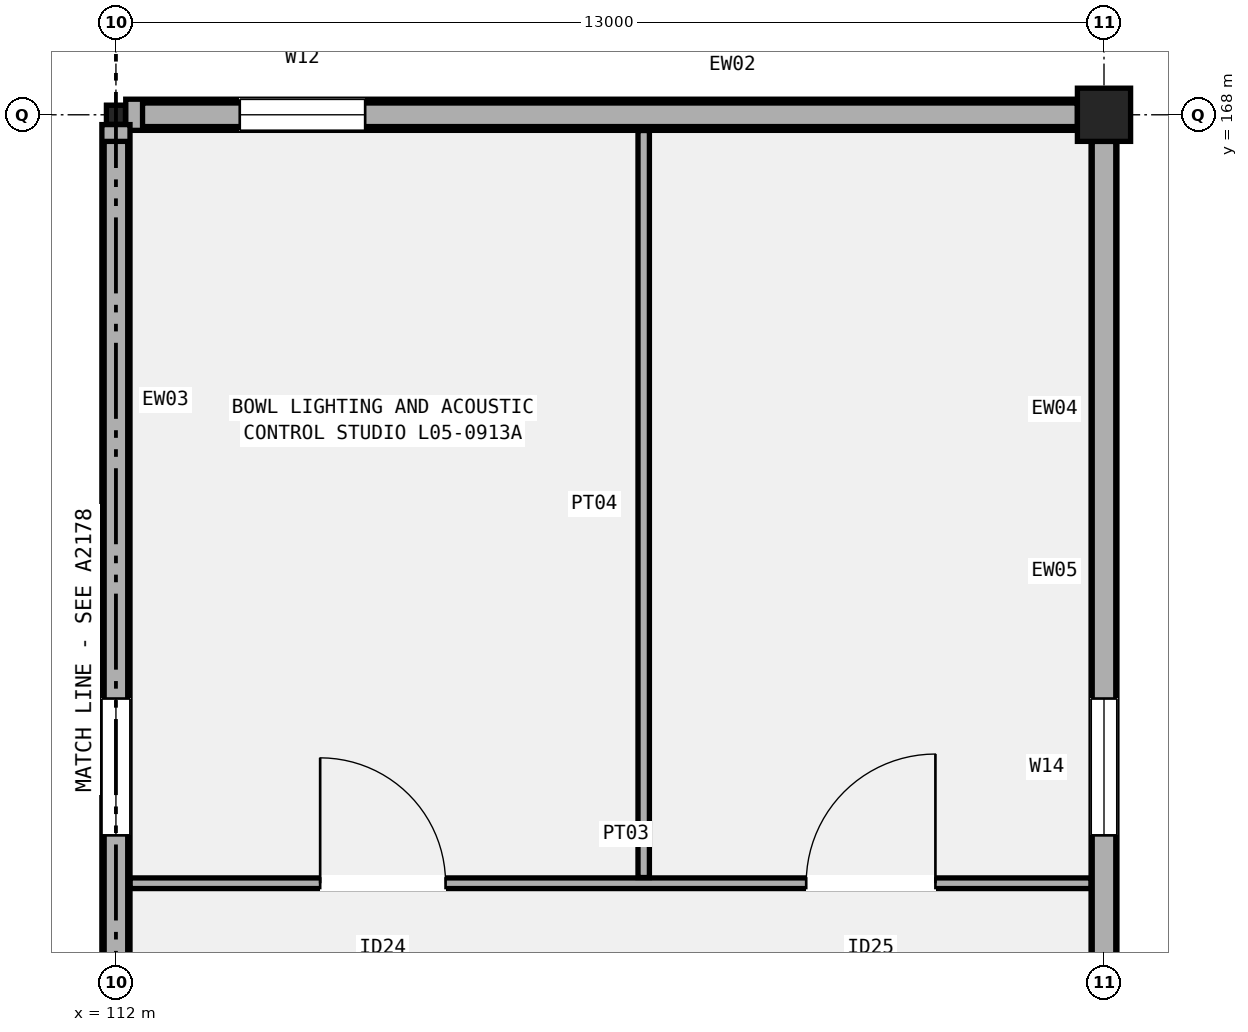
"""IFC4 building model, lengths in metres.
Left out: names, types, materials, properties, quantities, classifications, styles, units other than length and angle.
Written with IfcOpenShell. Run it as: python <this file> out.ifc"""

import sys

from ifc_helpers import new_model, si_unit, direction, frame, frame_2d, origin, origin_2d, place, context, subcontext, project, spatial, rectangle, hollow_rectangle, extrude, element, fill, save


model = new_model("IFC4")
c1 = context("Model", 3, precision=1e-05, world=origin(), true_north=direction((0.0, 1.0)))
c2 = subcontext(c1, "Body", "Model", "MODEL_VIEW")
j1 = project(units=[si_unit("LENGTHUNIT", "METRE"), si_unit("PLANEANGLEUNIT", "RADIAN")], contexts=[c1])
p1 = place(None, origin())
s1 = spatial("IfcSite", under=j1, at=p1, CompositionType="ELEMENT")
p2 = place(p1, origin())
s2 = spatial("IfcBuilding", under=s1, at=p2, CompositionType="ELEMENT")
p3 = place(p2, frame((0.0, 0.0, 25.8)))
s3 = spatial("IfcBuildingStorey", under=s2, at=p3, CompositionType="ELEMENT", Elevation=25.8)
p4 = place(p3, frame((112.0, 168.0, 0.0), z_axis=(0.0, 0.0, 1.0), x_axis=(1.0, 0.0, 0.0)))
e1 = element("IfcColumn", 1, at=p4, inside=s3, PredefinedType="COLUMN", context=c2, shape_type="SweptSolid", body=[
    extrude(hollow_rectangle(XDim=0.25, YDim=0.25, WallThickness=0.012, InnerFilletRadius=0.012, OuterFilletRadius=0.024, at=origin_2d()), origin(), (0.0, 0.0, 1.0), 5.4),
])
p5 = place(p3, frame((125.0, 168.0, 0.0), z_axis=(0.0, 0.0, 1.0), x_axis=(1.0, 0.0, 0.0)))
e2 = element("IfcColumn", 2, at=p5, inside=s3, PredefinedType="COLUMN", context=c2, shape_type="SweptSolid", body=[
    extrude(rectangle(XDim=0.7, YDim=0.7, at=origin_2d()), origin(), (0.0, 0.0, 1.0), 5.4),
])
p6 = place(p3, frame((112.129, 168.0, 0.0), z_axis=(0.0, 0.0, 1.0), x_axis=(1.0, 0.0, 0.0)))
e3 = element("IfcWall", 3, at=p6, inside=s3, PredefinedType="SOLIDWALL", context=c2, shape_type="SweptSolid", body=[
    extrude(rectangle(XDim=12.517, YDim=0.41, at=frame_2d((6.259, 0.0))), origin(), (0.0, 0.0, 1.0), 4.452),
])
p7 = place(p6, frame((1.5, 0.0, 0.95)))
e4 = element("IfcOpeningElement", 4, at=p7, cuts=e3, PredefinedType="OPENING", context=c2, shape_type="SweptSolid", body=[
    extrude(rectangle(XDim=1.65, YDim=2.45, at=frame_2d((0.825, 1.225))), frame((0.0, 0.215, 0.0), z_axis=(0.0, -1.0, 0.0), x_axis=(1.0, 0.0, 0.0)), (0.0, 0.0, 1.0), 0.43),
])
p8 = place(p3, frame((112.0, 156.154, 0.0), z_axis=(0.0, 0.0, 1.0), x_axis=(0.0, 1.0, 0.0)))
e5 = element("IfcWall", 5, at=p8, inside=s3, PredefinedType="SOLIDWALL", context=c2, shape_type="SweptSolid", body=[
    extrude(rectangle(XDim=11.717, YDim=0.37, at=frame_2d((5.858, 0.0))), origin(), (0.0, 0.0, 1.0), 4.44),
])
p9 = place(p8, frame((2.366, 0.0, 0.95)))
e6 = element("IfcOpeningElement", 6, at=p9, cuts=e5, PredefinedType="OPENING", context=c2, shape_type="SweptSolid", body=[
    extrude(rectangle(XDim=1.8, YDim=1.75, at=frame_2d((0.9, 0.875))), frame((0.0, 0.195, 0.0), z_axis=(0.0, -1.0, 0.0), x_axis=(1.0, 0.0, 0.0)), (0.0, 0.0, 1.0), 0.39),
])
p10 = place(p3, frame((125.0, 156.129, 0.0), z_axis=(0.0, 0.0, 1.0), x_axis=(0.0, 1.0, 0.0)))
e7 = element("IfcWall", 7, at=p10, inside=s3, PredefinedType="SOLIDWALL", context=c2, shape_type="SweptSolid", body=[
    extrude(rectangle(XDim=11.517, YDim=0.34, at=frame_2d((5.759, 0.0))), origin(), (0.0, 0.0, 1.0), 4.452),
])
p11 = place(p10, frame((2.391, 0.0, 0.95)))
e8 = element("IfcOpeningElement", 8, at=p11, cuts=e7, PredefinedType="OPENING", context=c2, shape_type="SweptSolid", body=[
    extrude(rectangle(XDim=1.8, YDim=2.15, at=frame_2d((0.9, 1.075))), frame((0.0, 0.18, 0.0), z_axis=(0.0, -1.0, 0.0), x_axis=(1.0, 0.0, 0.0)), (0.0, 0.0, 1.0), 0.36),
])
p12 = place(p3, frame((112.35, 168.0, 5.4), z_axis=(0.0, 0.0, 1.0), x_axis=(1.0, 0.0, 0.0)))
e9 = element("IfcWall", 9, at=p12, inside=s3, PredefinedType="SOLIDWALL", context=c2, shape_type="SweptSolid", body=[
    extrude(rectangle(XDim=12.3, YDim=0.31, at=frame_2d((6.15, 0.0))), origin(), (0.0, 0.0, 1.0), 0.88),
])
for number, where, z_axis, x_axis in (
    (10, (112.0, 156.35, 5.4), (0.0, 0.0, 1.0), (0.0, 1.0, 0.0)),
    (11, (125.0, 156.35, 5.4), (0.0, 0.0, 1.0), (0.0, 1.0, 0.0)),
):
    element("IfcWall", number, at=place(p3, frame(where, z_axis=z_axis, x_axis=x_axis)), inside=s3, PredefinedType="SOLIDWALL", context=c2, shape_type="SweptSolid", body=[
        extrude(rectangle(XDim=11.3, YDim=0.31, at=frame_2d((5.65, 0.0))), origin(), (0.0, 0.0, 1.0), 0.88),
    ])
p13 = place(p3, frame((112.187, 157.89, 0.0), z_axis=(0.0, 0.0, 1.0), x_axis=(1.0, 0.0, 0.0)))
e12 = element("IfcWall", 12, at=p13, inside=s3, PredefinedType="PARTITIONING", context=c2, shape_type="SweptSolid", body=[
    extrude(rectangle(XDim=12.641, YDim=0.14, at=frame_2d((6.32, 0.0))), origin(), (0.0, 0.0, 1.0), 4.35),
])
p14 = place(p13, frame((2.5, 0.0, 0.0)))
e13 = element("IfcOpeningElement", 13, at=p14, cuts=e12, PredefinedType="OPENING", context=c2, shape_type="SweptSolid", body=[
    extrude(rectangle(XDim=1.65, YDim=2.28, at=frame_2d((0.825, 1.14))), frame((0.0, 0.08, 0.0), z_axis=(0.0, -1.0, 0.0), x_axis=(1.0, 0.0, 0.0)), (0.0, 0.0, 1.0), 0.16),
])
p15 = place(p13, frame((8.895, 0.0, 0.0)))
e14 = element("IfcOpeningElement", 14, at=p15, cuts=e12, PredefinedType="OPENING", context=c2, shape_type="SweptSolid", body=[
    extrude(rectangle(XDim=1.7, YDim=2.32, at=frame_2d((0.85, 1.16))), frame((0.0, 0.08, 0.0), z_axis=(0.0, -1.0, 0.0), x_axis=(1.0, 0.0, 0.0)), (0.0, 0.0, 1.0), 0.16),
])
p16 = place(p3, frame((118.944, 157.965, 0.0), z_axis=(0.0, 0.0, 1.0), x_axis=(0.0, 1.0, 0.0)))
e15 = element("IfcWall", 15, at=p16, inside=s3, PredefinedType="PARTITIONING", context=c2, shape_type="SweptSolid", body=[
    extrude(rectangle(XDim=9.828, YDim=0.15, at=frame_2d((4.914, 0.0))), origin(), (0.0, 0.0, 1.0), 4.35),
])
p17 = place(p7, origin())
e16 = element("IfcWindow", 16, at=p17, inside=s3, PartitioningType="SINGLE_PANEL", PredefinedType="WINDOW", context=c2, shape_type="SweptSolid", body=[
    extrude(rectangle(XDim=1.65, YDim=2.45, at=frame_2d((0.825, 1.225))), frame((0.0, 0.03, 0.0), z_axis=(0.0, -1.0, 0.0), x_axis=(1.0, 0.0, 0.0)), (0.0, 0.0, 1.0), 0.06),
])
fill(e4, e16)
p18 = place(p9, origin())
e17 = element("IfcWindow", 17, at=p18, inside=s3, PartitioningType="SINGLE_PANEL", PredefinedType="WINDOW", context=c2, shape_type="SweptSolid", body=[
    extrude(rectangle(XDim=1.8, YDim=1.75, at=frame_2d((0.9, 0.875))), frame((0.0, 0.03, 0.0), z_axis=(0.0, -1.0, 0.0), x_axis=(1.0, 0.0, 0.0)), (0.0, 0.0, 1.0), 0.06),
])
fill(e6, e17)
p19 = place(p11, origin())
e18 = element("IfcWindow", 18, at=p19, inside=s3, PartitioningType="SINGLE_PANEL", PredefinedType="WINDOW", context=c2, shape_type="SweptSolid", body=[
    extrude(rectangle(XDim=1.8, YDim=2.15, at=frame_2d((0.9, 1.075))), frame((0.0, 0.03, 0.0), z_axis=(0.0, -1.0, 0.0), x_axis=(1.0, 0.0, 0.0)), (0.0, 0.0, 1.0), 0.06),
])
fill(e8, e18)
p20 = place(p14, origin())
e19 = element("IfcDoor", 19, at=p20, inside=s3, OperationType="SINGLE_SWING_LEFT", PredefinedType="DOOR", context=c2, shape_type="SweptSolid", body=[
    extrude(rectangle(XDim=1.65, YDim=2.28, at=frame_2d((0.825, 1.14))), frame((0.0, 0.025, 0.0), z_axis=(0.0, -1.0, 0.0), x_axis=(1.0, 0.0, 0.0)), (0.0, 0.0, 1.0), 0.05),
])
fill(e13, e19)
p21 = place(p15, origin())
e20 = element("IfcDoor", 20, at=p21, inside=s3, OperationType="SINGLE_SWING_RIGHT", PredefinedType="DOOR", context=c2, shape_type="SweptSolid", body=[
    extrude(rectangle(XDim=1.7, YDim=2.32, at=frame_2d((0.85, 1.16))), frame((0.0, 0.025, 0.0), z_axis=(0.0, -1.0, 0.0), x_axis=(1.0, 0.0, 0.0)), (0.0, 0.0, 1.0), 0.05),
])
fill(e14, e20)
save(model, sys.argv[1])
